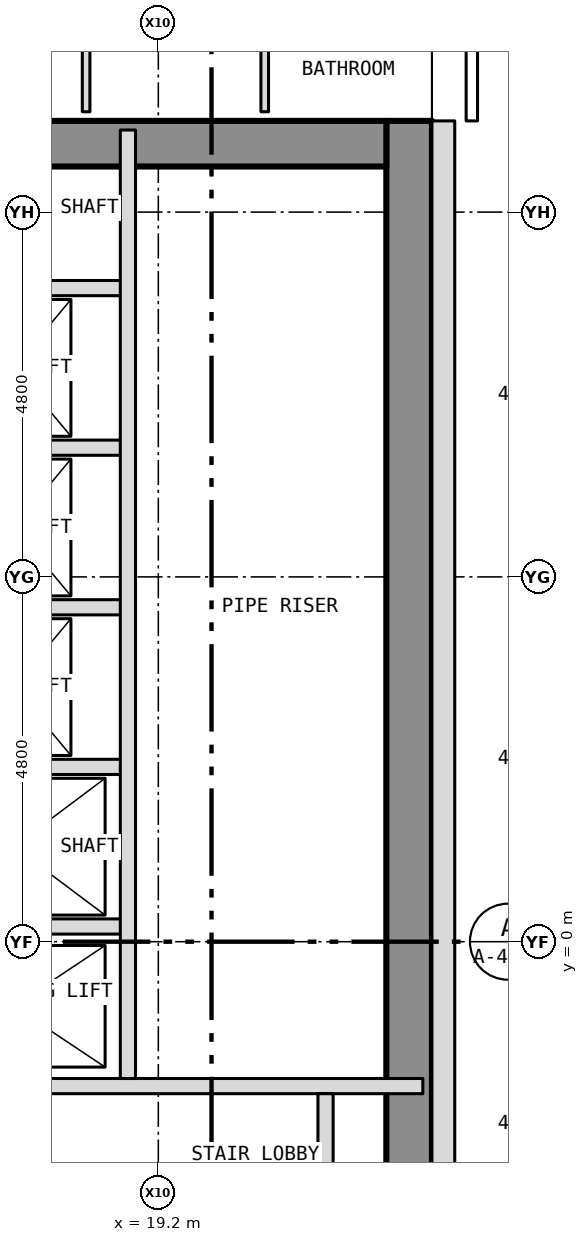
"""IFC4 building model, lengths in metres.
Left out: names, types, materials, properties, quantities, classifications, styles, units other than length and angle.
Written with IfcOpenShell. Run it as: python <this file> out.ifc"""

import sys

from ifc_helpers import new_model, si_unit, direction, frame, frame_2d, origin, place, context, subcontext, project, spatial, rectangle, extrude, element, save


model = new_model("IFC4")
c1 = context("Model", 3, precision=1e-05, world=origin(), true_north=direction((0.0, 1.0)))
c2 = subcontext(c1, "Body", "Model", "MODEL_VIEW")
j1 = project(units=[si_unit("LENGTHUNIT", "METRE"), si_unit("PLANEANGLEUNIT", "RADIAN")], contexts=[c1])
p1 = place(None, origin())
s1 = spatial("IfcSite", under=j1, at=p1, CompositionType="ELEMENT")
p2 = place(p1, origin())
s2 = spatial("IfcBuilding", under=s1, at=p2, CompositionType="ELEMENT")
p3 = place(p2, frame((0.0, 0.0, 120.5)))
s3 = spatial("IfcBuildingStorey", under=s2, at=p3, CompositionType="ELEMENT", Elevation=120.5)
p4 = place(p3, frame((22.5, -10.8, 0.0), z_axis=(0.0, 0.0, 1.0), x_axis=(0.0, 1.0, 0.0)))
e1 = element("IfcWall", 1, at=p4, inside=s3, PredefinedType="SHEAR", context=c2, shape_type="SweptSolid", body=[
    extrude(rectangle(XDim=21.6, YDim=0.6, at=frame_2d((10.8, 0.0))), origin(), (0.0, 0.0, 1.0), 3.25),
])
p5 = place(p3, frame((16.4, 10.5, 0.0), z_axis=(0.0, 0.0, 1.0), x_axis=(1.0, 0.0, 0.0)))
e2 = element("IfcWall", 2, at=p5, inside=s3, PredefinedType="SHEAR", context=c2, shape_type="SweptSolid", body=[
    extrude(rectangle(XDim=5.8, YDim=0.6, at=frame_2d((2.9, 0.0))), origin(), (0.0, 0.0, 1.0), 3.25),
])
p6 = place(p3, frame((22.95, -10.8, 0.0), z_axis=(0.0, 0.0, 1.0), x_axis=(0.0, 1.0, 0.0)))
e3 = element("IfcWall", 3, at=p6, inside=s3, PredefinedType="SOLIDWALL", context=c2, shape_type="SweptSolid", body=[
    extrude(rectangle(XDim=21.6, YDim=0.3, at=frame_2d((10.8, 0.0))), origin(), (0.0, 0.0, 1.0), 3.5),
])
p7 = place(p6, frame((2.95, 0.0, 1.0)))
e4 = element("IfcOpeningElement", 4, at=p7, cuts=e3, PredefinedType="OPENING", context=c2, shape_type="SweptSolid", body=[
    extrude(rectangle(XDim=0.6, YDim=1.5, at=frame_2d((0.3, 0.75))), frame((0.0, 0.162, 0.0), z_axis=(0.0, -1.0, 0.0), x_axis=(1.0, 0.0, 0.0)), (0.0, 0.0, 1.0), 0.324),
])
p8 = place(p3, frame((15.92, -1.9, 0.0), z_axis=(0.0, 0.0, 1.0), x_axis=(1.0, 0.0, 0.0)))
e5 = element("IfcWall", 5, at=p8, inside=s3, PredefinedType="PARTITIONING", context=c2, shape_type="SweptSolid", body=[
    extrude(rectangle(XDim=6.76, YDim=0.2, at=frame_2d((3.38, 0.0))), origin(), (0.0, 0.0, 1.0), 3.25),
])
for number, where, z_axis, x_axis in (
    (6, (15.92, 0.2, 0.0), (0.0, 0.0, 1.0), (1.0, 0.0, 0.0)),
    (7, (15.92, 2.3, 0.0), (0.0, 0.0, 1.0), (1.0, 0.0, 0.0)),
    (8, (15.92, 4.4, 0.0), (0.0, 0.0, 1.0), (1.0, 0.0, 0.0)),
    (9, (15.92, 6.5, 0.0), (0.0, 0.0, 1.0), (1.0, 0.0, 0.0)),
    (10, (15.92, 8.6, 0.0), (0.0, 0.0, 1.0), (1.0, 0.0, 0.0)),
):
    element("IfcWall", number, at=place(p3, frame(where, z_axis=z_axis, x_axis=x_axis)), inside=s3, PredefinedType="PARTITIONING", context=c2, shape_type="SweptSolid", body=[
        extrude(rectangle(XDim=2.88, YDim=0.2, at=frame_2d((1.44, 0.0))), origin(), (0.0, 0.0, 1.0), 3.25),
    ])
p9 = place(p3, frame((18.25, 10.92, 0.0), z_axis=(0.0, 0.0, 1.0), x_axis=(0.0, 1.0, 0.0)))
e11 = element("IfcWall", 11, at=p9, inside=s3, PredefinedType="PARTITIONING", context=c2, shape_type="SweptSolid", body=[
    extrude(rectangle(XDim=7.271, YDim=0.1, at=frame_2d((3.635, 0.0))), origin(), (0.0, 0.0, 1.0), 3.35),
])
p10 = place(p9, frame((5.43, 0.0, 0.0)))
e12 = element("IfcOpeningElement", 12, at=p10, cuts=e11, PredefinedType="OPENING", context=c2, shape_type="SweptSolid", body=[
    extrude(rectangle(XDim=0.9, YDim=2.1, at=frame_2d((0.45, 1.05))), frame((0.0, 0.062, 0.0), z_axis=(0.0, -1.0, 0.0), x_axis=(1.0, 0.0, 0.0)), (0.0, 0.0, 1.0), 0.124),
])
p11 = place(p3, frame((18.8, -1.8, 0.0), z_axis=(0.0, 0.0, 1.0), x_axis=(0.0, 1.0, 0.0)))
e13 = element("IfcWall", 13, at=p11, inside=s3, PredefinedType="PARTITIONING", context=c2, shape_type="SweptSolid", body=[
    extrude(rectangle(XDim=12.48, YDim=0.2, at=frame_2d((6.24, 0.0))), origin(), (0.0, 0.0, 1.0), 3.25),
])
p12 = place(p3, frame((20.6, 10.92, 0.0), z_axis=(0.0, 0.0, 1.0), x_axis=(0.0, 1.0, 0.0)))
e14 = element("IfcWall", 14, at=p12, inside=s3, PredefinedType="PARTITIONING", context=c2, shape_type="SweptSolid", body=[
    extrude(rectangle(XDim=3.03, YDim=0.1, at=frame_2d((1.515, 0.0))), origin(), (0.0, 0.0, 1.0), 3.35),
])
p13 = place(p12, frame((1.67, 0.0, 0.0)))
e15 = element("IfcOpeningElement", 15, at=p13, cuts=e14, PredefinedType="OPENING", context=c2, shape_type="SweptSolid", body=[
    extrude(rectangle(XDim=0.9, YDim=2.1, at=frame_2d((0.45, 1.05))), frame((0.0, 0.062, 0.0), z_axis=(0.0, -1.0, 0.0), x_axis=(1.0, 0.0, 0.0)), (0.0, 0.0, 1.0), 0.124),
])
p14 = place(p3, frame((21.4, -10.68, 0.0), z_axis=(0.0, 0.0, 1.0), x_axis=(0.0, 1.0, 0.0)))
e16 = element("IfcWall", 16, at=p14, inside=s3, PredefinedType="PARTITIONING", context=c2, shape_type="SweptSolid", body=[
    extrude(rectangle(XDim=8.68, YDim=0.2, at=frame_2d((4.34, 0.0))), origin(), (0.0, 0.0, 1.0), 3.25),
])
p15 = place(p14, frame((3.88, 0.0, 0.0)))
e17 = element("IfcOpeningElement", 17, at=p15, cuts=e16, PredefinedType="OPENING", context=c2, shape_type="SweptSolid", body=[
    extrude(rectangle(XDim=0.9, YDim=2.1, at=frame_2d((0.45, 1.05))), frame((0.0, 0.112, 0.0), z_axis=(0.0, -1.0, 0.0), x_axis=(1.0, 0.0, 0.0)), (0.0, 0.0, 1.0), 0.224),
])
save(model, sys.argv[1])
